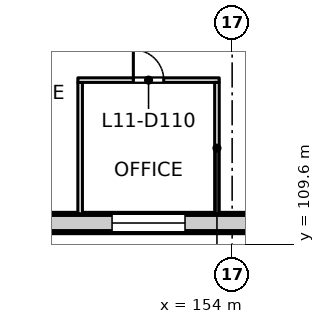
"""IFC4 building model, lengths in metres.
Left out: names, types, materials, properties, quantities, classifications, styles, units other than length and angle.
Written with IfcOpenShell. Run it as: python <this file> out.ifc"""

import sys

from ifc_helpers import new_model, si_unit, direction, frame, frame_2d, origin, place, context, subcontext, project, spatial, rectangle, extrude, element, fill, save


model = new_model("IFC4")
c1 = context("Model", 3, precision=1e-05, world=origin(), true_north=direction((0.0, 1.0)))
c2 = subcontext(c1, "Body", "Model", "MODEL_VIEW")
j1 = project(units=[si_unit("LENGTHUNIT", "METRE"), si_unit("PLANEANGLEUNIT", "RADIAN")], contexts=[c1])
p1 = place(None, origin())
s1 = spatial("IfcSite", under=j1, at=p1, CompositionType="ELEMENT")
p2 = place(p1, origin())
s2 = spatial("IfcBuilding", under=s1, at=p2, CompositionType="ELEMENT")
p3 = place(p2, frame((0.0, 0.0, 51.5)))
s3 = spatial("IfcBuildingStorey", under=s2, at=p3, CompositionType="ELEMENT", Elevation=51.5)
p4 = place(p3, frame((162.93, 110.3, 0.0), z_axis=(0.0, 0.0, 1.0), x_axis=(-1.0, 0.0, 0.0)))
e1 = element("IfcWall", 1, at=p4, inside=s3, PredefinedType="SOLIDWALL", context=c2, shape_type="SweptSolid", body=[
    extrude(rectangle(XDim=31.93, YDim=0.6, at=frame_2d((15.965, 0.0))), origin(), (0.0, 0.0, 1.0), 3.625),
])
p5 = place(p4, frame((1.48, 0.0, 0.9)))
e2 = element("IfcOpeningElement", 2, at=p5, cuts=e1, PredefinedType="OPENING", context=c2, shape_type="SweptSolid", body=[
    extrude(rectangle(XDim=2.4, YDim=2.4, at=frame_2d((1.2, 1.2))), frame((0.0, 0.31, 0.0), z_axis=(0.0, -1.0, 0.0), x_axis=(1.0, 0.0, 0.0)), (0.0, 0.0, 1.0), 0.62),
])
p6 = place(p4, frame((5.98, 0.0, 0.9)))
e3 = element("IfcOpeningElement", 3, at=p6, cuts=e1, PredefinedType="OPENING", context=c2, shape_type="SweptSolid", body=[
    extrude(rectangle(XDim=2.4, YDim=2.4, at=frame_2d((1.2, 1.2))), frame((0.0, 0.31, 0.0), z_axis=(0.0, -1.0, 0.0), x_axis=(1.0, 0.0, 0.0)), (0.0, 0.0, 1.0), 0.62),
])
p7 = place(p4, frame((10.48, 0.0, 0.9)))
e4 = element("IfcOpeningElement", 4, at=p7, cuts=e1, PredefinedType="OPENING", context=c2, shape_type="SweptSolid", body=[
    extrude(rectangle(XDim=2.4, YDim=2.4, at=frame_2d((1.2, 1.2))), frame((0.0, 0.31, 0.0), z_axis=(0.0, -1.0, 0.0), x_axis=(1.0, 0.0, 0.0)), (0.0, 0.0, 1.0), 0.62),
])
p8 = place(p4, frame((14.98, 0.0, 0.9)))
e5 = element("IfcOpeningElement", 5, at=p8, cuts=e1, PredefinedType="OPENING", context=c2, shape_type="SweptSolid", body=[
    extrude(rectangle(XDim=2.4, YDim=2.4, at=frame_2d((1.2, 1.2))), frame((0.0, 0.31, 0.0), z_axis=(0.0, -1.0, 0.0), x_axis=(1.0, 0.0, 0.0)), (0.0, 0.0, 1.0), 0.62),
])
p9 = place(p4, frame((19.48, 0.0, 0.9)))
e6 = element("IfcOpeningElement", 6, at=p9, cuts=e1, PredefinedType="OPENING", context=c2, shape_type="SweptSolid", body=[
    extrude(rectangle(XDim=2.4, YDim=2.4, at=frame_2d((1.2, 1.2))), frame((0.0, 0.31, 0.0), z_axis=(0.0, -1.0, 0.0), x_axis=(1.0, 0.0, 0.0)), (0.0, 0.0, 1.0), 0.62),
])
p10 = place(p4, frame((23.98, 0.0, 0.9)))
e7 = element("IfcOpeningElement", 7, at=p10, cuts=e1, PredefinedType="OPENING", context=c2, shape_type="SweptSolid", body=[
    extrude(rectangle(XDim=2.4, YDim=2.4, at=frame_2d((1.2, 1.2))), frame((0.0, 0.31, 0.0), z_axis=(0.0, -1.0, 0.0), x_axis=(1.0, 0.0, 0.0)), (0.0, 0.0, 1.0), 0.62),
])
p11 = place(p4, frame((28.48, 0.0, 0.9)))
e8 = element("IfcOpeningElement", 8, at=p11, cuts=e1, PredefinedType="OPENING", context=c2, shape_type="SweptSolid", body=[
    extrude(rectangle(XDim=2.4, YDim=2.4, at=frame_2d((1.2, 1.2))), frame((0.0, 0.31, 0.0), z_axis=(0.0, -1.0, 0.0), x_axis=(1.0, 0.0, 0.0)), (0.0, 0.0, 1.0), 0.62),
])
p12 = place(p3, frame((149.0, 110.6, 0.0), z_axis=(0.0, 0.0, 1.0), x_axis=(0.0, 1.0, 0.0)))
e9 = element("IfcWall", 9, at=p12, inside=s3, PredefinedType="PARTITIONING", context=c2, shape_type="SweptSolid", body=[
    extrude(rectangle(XDim=4.325, YDim=0.15, at=frame_2d((2.163, 0.0))), origin(), (0.0, 0.0, 1.0), 3.625),
])
p13 = place(p3, frame((148.925, 115.0, 0.0), z_axis=(0.0, 0.0, 1.0), x_axis=(1.0, 0.0, 0.0)))
e10 = element("IfcWall", 10, at=p13, inside=s3, PredefinedType="PARTITIONING", context=c2, shape_type="SweptSolid", body=[
    extrude(rectangle(XDim=4.65, YDim=0.15, at=frame_2d((2.325, 0.0))), origin(), (0.0, 0.0, 1.0), 3.625),
])
p14 = place(p13, frame((1.825, 0.0, 0.0)))
e11 = element("IfcOpeningElement", 11, at=p14, cuts=e10, PredefinedType="OPENING", context=c2, shape_type="SweptSolid", body=[
    extrude(rectangle(XDim=1.0, YDim=2.1, at=frame_2d((0.5, 1.05))), frame((0.0, 0.085, 0.0), z_axis=(0.0, -1.0, 0.0), x_axis=(1.0, 0.0, 0.0)), (0.0, 0.0, 1.0), 0.17),
])
p15 = place(p3, frame((153.5, 114.925, 0.0), z_axis=(0.0, 0.0, 1.0), x_axis=(0.0, -1.0, 0.0)))
e12 = element("IfcWall", 12, at=p15, inside=s3, PredefinedType="PARTITIONING", context=c2, shape_type="SweptSolid", body=[
    extrude(rectangle(XDim=4.325, YDim=0.15, at=frame_2d((2.163, 0.0))), origin(), (0.0, 0.0, 1.0), 3.625),
])
p16 = place(p7, origin())
e13 = element("IfcWindow", 13, at=p16, inside=s3, PartitioningType="SINGLE_PANEL", PredefinedType="WINDOW", context=c2, shape_type="SweptSolid", body=[
    extrude(rectangle(XDim=2.4, YDim=2.4, at=frame_2d((1.2, 1.2))), frame((0.0, 0.03, 0.0), z_axis=(0.0, -1.0, 0.0), x_axis=(1.0, 0.0, 0.0)), (0.0, 0.0, 1.0), 0.06),
])
fill(e4, e13)
p17 = place(p14, origin())
e14 = element("IfcDoor", 14, at=p17, inside=s3, OperationType="SINGLE_SWING_LEFT", PredefinedType="DOOR", context=c2, shape_type="SweptSolid", body=[
    extrude(rectangle(XDim=1.0, YDim=2.1, at=frame_2d((0.5, 1.05))), frame((0.0, 0.025, 0.0), z_axis=(0.0, -1.0, 0.0), x_axis=(1.0, 0.0, 0.0)), (0.0, 0.0, 1.0), 0.05),
])
fill(e11, e14)
save(model, sys.argv[1])
